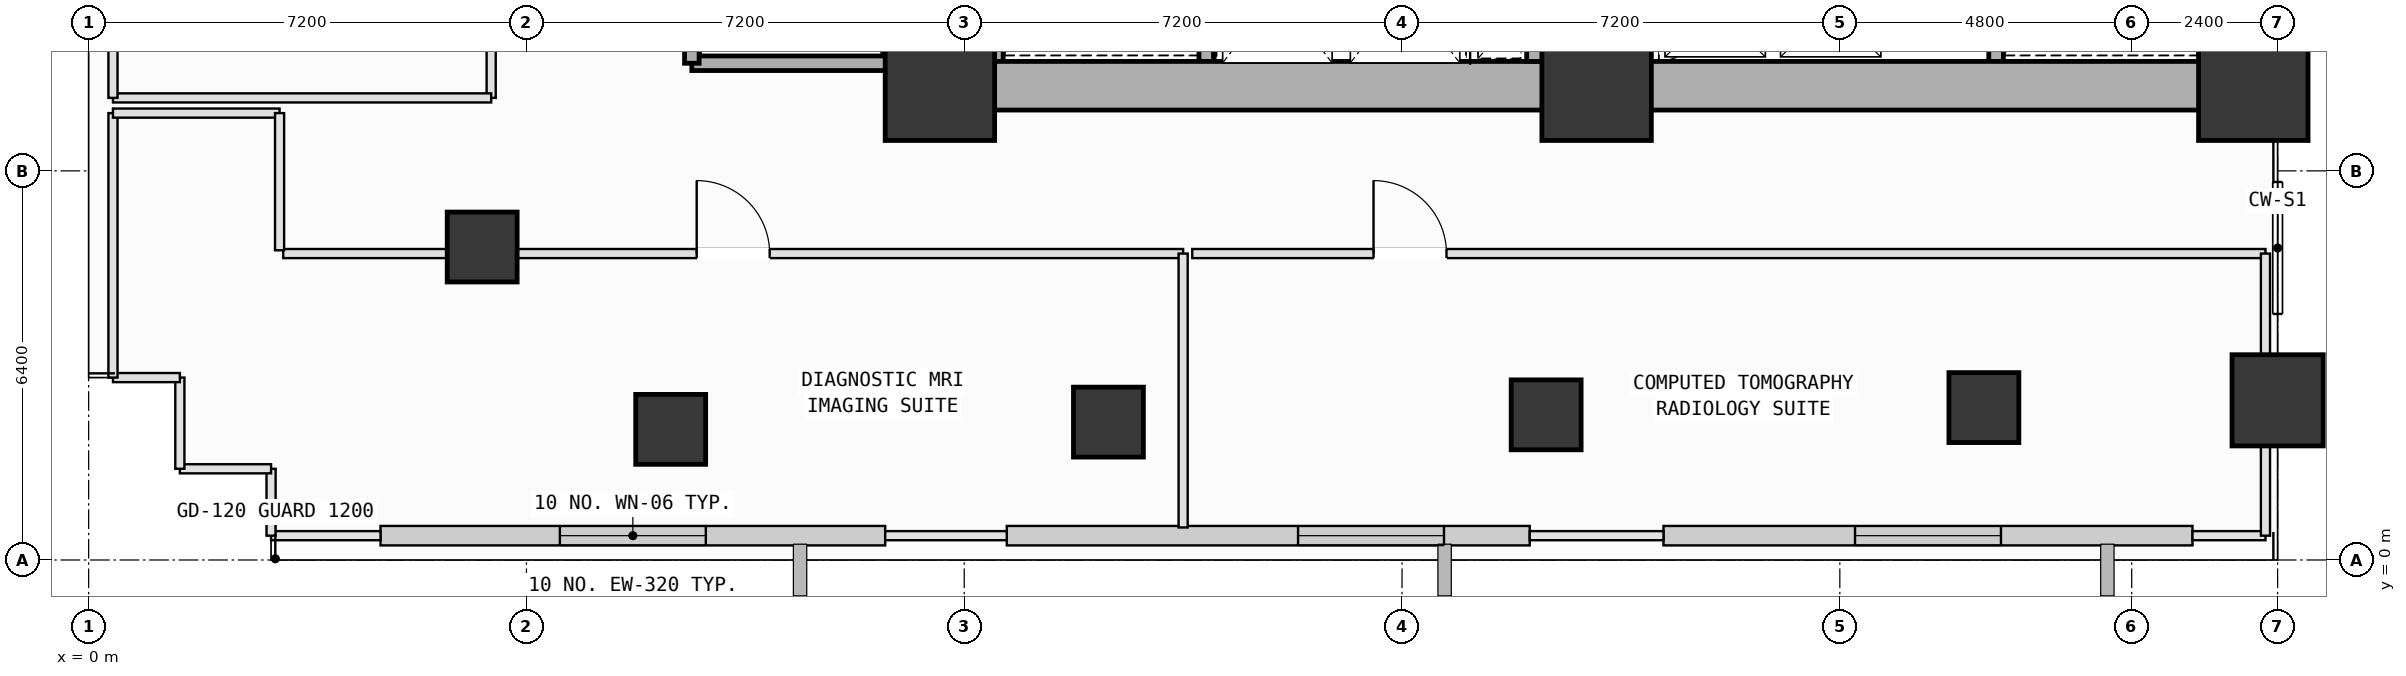
"""IFC4 building model, lengths in metres.
Left out: names, types, materials, properties, quantities, classifications, styles, units other than length and angle.
Written with IfcOpenShell. Run it as: python <this file> out.ifc"""

import sys

from ifc_helpers import new_model, si_unit, direction, frame, frame_2d, origin, origin_2d, place, context, subcontext, project, spatial, rectangle, extrude, element, fill, save


model = new_model("IFC4")
c1 = context("Model", 3, precision=1e-05, world=origin(), true_north=direction((0.0, 1.0)))
c2 = subcontext(c1, "Body", "Model", "MODEL_VIEW")
j1 = project(units=[si_unit("LENGTHUNIT", "METRE"), si_unit("PLANEANGLEUNIT", "RADIAN")], contexts=[c1])
p1 = place(None, origin())
s1 = spatial("IfcSite", under=j1, at=p1, CompositionType="ELEMENT")
p2 = place(p1, origin())
s2 = spatial("IfcBuilding", under=s1, at=p2, CompositionType="ELEMENT")
p3 = place(p2, frame((0.0, 0.0, 5.4)))
s3 = spatial("IfcBuildingStorey", under=s2, at=p3, CompositionType="ELEMENT", Elevation=5.4)
for number, where, z_axis, x_axis in (
    (1, (14.0, 7.8, 0.0), (0.0, 0.0, 1.0), (1.0, 0.0, 0.0)),
    (2, (24.8, 7.8, 0.0), (0.0, 0.0, 1.0), (1.0, 0.0, 0.0)),
    (3, (35.6, 7.8, 0.0), (0.0, 0.0, 1.0), (1.0, 0.0, 0.0)),
):
    element("IfcColumn", number, at=place(p3, frame(where, z_axis=z_axis, x_axis=x_axis)), inside=s3, PredefinedType="COLUMN", context=c2, shape_type="SweptSolid", body=[
        extrude(rectangle(XDim=1.8, YDim=1.8, at=origin_2d()), origin(), (0.0, 0.0, 1.0), 5.4),
    ])
p4 = place(p3, frame((36.0, 2.626, 0.0), z_axis=(0.0, 0.0, 1.0), x_axis=(1.0, 0.0, 0.0)))
e4 = element("IfcColumn", 4, at=p4, inside=s3, PredefinedType="PILASTER", context=c2, shape_type="SweptSolid", body=[
    extrude(rectangle(XDim=1.5, YDim=1.5, at=origin_2d()), origin(), (0.0, 0.0, 1.0), 5.4),
])
for number, where, z_axis, x_axis in (
    (5, (9.572, 2.148, 0.0), (0.0, 0.0, 1.0), (1.0, 0.0, 0.0)),
    (6, (16.771, 2.268, 0.0), (0.0, 0.0, 1.0), (1.0, 0.0, 0.0)),
    (7, (23.97, 2.387, 0.0), (0.0, 0.0, 1.0), (1.0, 0.0, 0.0)),
    (8, (31.169, 2.507, 0.0), (0.0, 0.0, 1.0), (1.0, 0.0, 0.0)),
    (9, (6.472, 5.147, 0.0), (0.0, 0.0, 1.0), (1.0, 0.0, 0.0)),
):
    element("IfcColumn", number, at=place(p3, frame(where, z_axis=z_axis, x_axis=x_axis)), inside=s3, PredefinedType="COLUMN", context=c2, shape_type="SweptSolid", body=[
        extrude(rectangle(XDim=1.15, YDim=1.15, at=origin_2d()), origin(), (0.0, 0.0, 1.0), 5.4),
    ])
p5 = place(p3, frame((13.1, 0.4, 0.0), z_axis=(0.0, 0.0, 1.0), x_axis=(-1.0, 0.0, 0.0)))
e10 = element("IfcWall", 10, at=p5, inside=s3, PredefinedType="SOLIDWALL", context=c2, shape_type="SweptSolid", body=[
    extrude(rectangle(XDim=8.3, YDim=0.32, at=frame_2d((4.15, 0.0))), origin(), (0.0, 0.0, 1.0), 4.23),
])
p6 = place(p5, frame((2.95, 0.0, 0.8)))
e11 = element("IfcOpeningElement", 11, at=p6, cuts=e10, PredefinedType="OPENING", context=c2, shape_type="SweptSolid", body=[
    extrude(rectangle(XDim=2.4, YDim=2.2, at=frame_2d((1.2, 1.1))), frame((0.0, 0.17, 0.0), z_axis=(0.0, -1.0, 0.0), x_axis=(1.0, 0.0, 0.0)), (0.0, 0.0, 1.0), 0.34),
])
p7 = place(p3, frame((23.7, 0.4, 0.0), z_axis=(0.0, 0.0, 1.0), x_axis=(-1.0, 0.0, 0.0)))
e12 = element("IfcWall", 12, at=p7, inside=s3, PredefinedType="SOLIDWALL", context=c2, shape_type="SweptSolid", body=[
    extrude(rectangle(XDim=8.6, YDim=0.32, at=frame_2d((4.3, 0.0))), origin(), (0.0, 0.0, 1.0), 4.23),
])
p8 = place(p7, frame((1.41, 0.0, 0.8)))
e13 = element("IfcOpeningElement", 13, at=p8, cuts=e12, PredefinedType="OPENING", context=c2, shape_type="SweptSolid", body=[
    extrude(rectangle(XDim=2.4, YDim=2.2, at=frame_2d((1.2, 1.1))), frame((0.0, 0.17, 0.0), z_axis=(0.0, -1.0, 0.0), x_axis=(1.0, 0.0, 0.0)), (0.0, 0.0, 1.0), 0.34),
])
p9 = place(p3, frame((34.6, 0.4, 0.0), z_axis=(0.0, 0.0, 1.0), x_axis=(-1.0, 0.0, 0.0)))
e14 = element("IfcWall", 14, at=p9, inside=s3, PredefinedType="SOLIDWALL", context=c2, shape_type="SweptSolid", body=[
    extrude(rectangle(XDim=8.7, YDim=0.32, at=frame_2d((4.35, 0.0))), origin(), (0.0, 0.0, 1.0), 4.23),
])
p10 = place(p9, frame((3.15, 0.0, 0.8)))
e15 = element("IfcOpeningElement", 15, at=p10, cuts=e14, PredefinedType="OPENING", context=c2, shape_type="SweptSolid", body=[
    extrude(rectangle(XDim=2.4, YDim=2.2, at=frame_2d((1.2, 1.1))), frame((0.0, 0.17, 0.0), z_axis=(0.0, -1.0, 0.0), x_axis=(1.0, 0.0, 0.0)), (0.0, 0.0, 1.0), 0.34),
])
for number, where, z_axis, x_axis in (
    (16, (18.38, 15.12, 0.0), (0.0, 0.0, 1.0), (0.0, -1.0, 0.0)),
    (17, (14.92, 8.2, 0.0), (0.0, 0.0, 1.0), (0.0, 1.0, 0.0)),
    (18, (34.83, 15.12, 0.0), (0.0, 0.0, 1.0), (0.0, -1.0, 0.0)),
    (19, (31.37, 8.2, 0.0), (0.0, 0.0, 1.0), (0.0, 1.0, 0.0)),
):
    element("IfcWall", number, at=place(p3, frame(where, z_axis=z_axis, x_axis=x_axis)), inside=s3, PredefinedType="SOLIDWALL", context=c2, shape_type="SweptSolid", body=[
        extrude(rectangle(XDim=6.92, YDim=0.24, at=frame_2d((3.46, 0.0))), origin(), (0.0, 0.0, 1.0), 5.15),
    ])
p11 = place(p3, frame((13.18, 15.22, 0.0), z_axis=(0.0, 0.0, 1.0), x_axis=(0.0, -1.0, 0.0)))
e20 = element("IfcWall", 20, at=p11, inside=s3, PredefinedType="SOLIDWALL", context=c2, shape_type="SweptSolid", body=[
    extrude(rectangle(XDim=7.05, YDim=0.24, at=frame_2d((3.525, 0.0))), origin(), (0.0, 0.0, 1.0), 5.15),
])
p12 = place(p3, frame((13.18, 8.17, 0.0), z_axis=(0.0, 0.0, 1.0), x_axis=(-1.0, 0.0, 0.0)))
e21 = element("IfcWall", 21, at=p12, inside=s3, PredefinedType="SOLIDWALL", context=c2, shape_type="SweptSolid", body=[
    extrude(rectangle(XDim=3.26, YDim=0.24, at=frame_2d((1.63, 0.0))), origin(), (0.0, 0.0, 1.0), 5.15),
])
p13 = place(p3, frame((9.92, 8.17, 0.0), z_axis=(0.0, 0.0, 1.0), x_axis=(0.0, 1.0, 0.0)))
e22 = element("IfcWall", 22, at=p13, inside=s3, PredefinedType="SOLIDWALL", context=c2, shape_type="SweptSolid", body=[
    extrude(rectangle(XDim=7.05, YDim=0.24, at=frame_2d((3.525, 0.0))), origin(), (0.0, 0.0, 1.0), 5.15),
])
for number, where, z_axis, x_axis in (
    (23, (14.0, 7.8, 0.0), (0.0, 0.0, 1.0), (1.0, 0.0, 0.0)),
    (24, (24.8, 7.8, 0.0), (0.0, 0.0, 1.0), (1.0, 0.0, 0.0)),
):
    element("IfcWall", number, at=place(p3, frame(where, z_axis=z_axis, x_axis=x_axis)), inside=s3, PredefinedType="SHEAR", context=c2, shape_type="SweptSolid", body=[
        extrude(rectangle(XDim=10.8, YDim=0.8, at=frame_2d((5.4, 0.0))), origin(), (0.0, 0.0, 1.0), 5.15),
    ])
for number, where, z_axis, x_axis in (
    (25, (35.6, 7.8, 0.0), (0.0, 0.0, 1.0), (0.0, 1.0, 0.0)),
    (26, (14.0, 16.8, 0.0), (0.0, 0.0, 1.0), (0.0, -1.0, 0.0)),
):
    element("IfcWall", number, at=place(p3, frame(where, z_axis=z_axis, x_axis=x_axis)), inside=s3, PredefinedType="SHEAR", context=c2, shape_type="SweptSolid", body=[
        extrude(rectangle(XDim=9.0, YDim=0.8, at=frame_2d((4.5, 0.0))), origin(), (0.0, 0.0, 1.0), 5.15),
    ])
p14 = place(p3, frame((23.8, 8.2, 0.0), z_axis=(0.0, 0.0, 1.0), x_axis=(0.0, 1.0, 0.0)))
e27 = element("IfcWall", 27, at=p14, inside=s3, PredefinedType="SOLIDWALL", context=c2, shape_type="SweptSolid", body=[
    extrude(rectangle(XDim=2.48, YDim=0.3, at=frame_2d((1.24, 0.0))), origin(), (0.0, 0.0, 1.0), 5.15),
])
p15 = place(p3, frame((6.62, 17.6, 0.0), z_axis=(0.0, 0.0, 1.0), x_axis=(0.0, -1.0, 0.0)))
e28 = element("IfcWall", 28, at=p15, inside=s3, PredefinedType="PARTITIONING", context=c2, shape_type="SweptSolid", body=[
    extrude(rectangle(XDim=10.0, YDim=0.15, at=frame_2d((5.0, 0.0))), origin(), (0.0, 0.0, 1.0), 4.235),
])
p16 = place(p15, frame((4.4, 0.0, 0.0)))
e29 = element("IfcOpeningElement", 29, at=p16, cuts=e28, PredefinedType="OPENING", context=c2, shape_type="SweptSolid", body=[
    extrude(rectangle(XDim=1.2, YDim=2.15, at=frame_2d((0.6, 1.075))), frame((0.0, 0.085, 0.0), z_axis=(0.0, -1.0, 0.0), x_axis=(1.0, 0.0, 0.0)), (0.0, 0.0, 1.0), 0.17),
])
p17 = place(p3, frame((6.62, 7.6, 0.0), z_axis=(0.0, 0.0, 1.0), x_axis=(-1.0, 0.0, 0.0)))
e30 = element("IfcWall", 30, at=p17, inside=s3, PredefinedType="PARTITIONING", context=c2, shape_type="SweptSolid", body=[
    extrude(rectangle(XDim=6.22, YDim=0.15, at=frame_2d((3.11, 0.0))), origin(), (0.0, 0.0, 1.0), 5.15),
])
p18 = place(p3, frame((0.4, 7.6, 0.0), z_axis=(0.0, 0.0, 1.0), x_axis=(0.0, 1.0, 0.0)))
e31 = element("IfcWall", 31, at=p18, inside=s3, PredefinedType="PARTITIONING", context=c2, shape_type="SweptSolid", body=[
    extrude(rectangle(XDim=6.0, YDim=0.15, at=frame_2d((3.0, 0.0))), origin(), (0.0, 0.0, 1.0), 5.15),
])
p19 = place(p3, frame((3.2, 5.04, 0.0), z_axis=(0.0, 0.0, 1.0), x_axis=(1.0, 0.0, 0.0)))
e32 = element("IfcWall", 32, at=p19, inside=s3, PredefinedType="PARTITIONING", context=c2, shape_type="SweptSolid", body=[
    extrude(rectangle(XDim=14.8, YDim=0.15, at=frame_2d((7.4, 0.0))), origin(), (0.0, 0.0, 1.0), 4.235),
])
p20 = place(p19, frame((6.8, 0.0, 0.0)))
e33 = element("IfcOpeningElement", 33, at=p20, cuts=e32, PredefinedType="OPENING", context=c2, shape_type="SweptSolid", body=[
    extrude(rectangle(XDim=1.2, YDim=2.15, at=frame_2d((0.6, 1.075))), frame((0.0, 0.085, 0.0), z_axis=(0.0, -1.0, 0.0), x_axis=(1.0, 0.0, 0.0)), (0.0, 0.0, 1.0), 0.17),
])
p21 = place(p3, frame((18.0, 5.04, 0.0), z_axis=(0.0, 0.0, 1.0), x_axis=(0.0, -1.0, 0.0)))
e34 = element("IfcWall", 34, at=p21, inside=s3, PredefinedType="PARTITIONING", context=c2, shape_type="SweptSolid", body=[
    extrude(rectangle(XDim=4.505, YDim=0.15, at=frame_2d((2.252, 0.0))), origin(), (0.0, 0.0, 1.0), 5.15),
])
p22 = place(p3, frame((15.1, 0.4, 0.0), z_axis=(0.0, 0.0, 1.0), x_axis=(-1.0, 0.0, 0.0)))
e35 = element("IfcWall", 35, at=p22, inside=s3, PredefinedType="PARTITIONING", context=c2, shape_type="SweptSolid", body=[
    extrude(rectangle(XDim=2.0, YDim=0.15, at=frame_2d((1.0, 0.0))), origin(), (0.0, 0.0, 1.0), 5.15),
])
p23 = place(p3, frame((4.8, 0.4, 0.0), z_axis=(0.0, 0.0, 1.0), x_axis=(-1.0, 0.0, 0.0)))
e36 = element("IfcWall", 36, at=p23, inside=s3, PredefinedType="PARTITIONING", context=c2, shape_type="SweptSolid", body=[
    extrude(rectangle(XDim=1.8, YDim=0.15, at=frame_2d((0.9, 0.0))), origin(), (0.0, 0.0, 1.0), 5.15),
])
p24 = place(p3, frame((3.0, 0.4, 0.0), z_axis=(0.0, 0.0, 1.0), x_axis=(0.0, 1.0, 0.0)))
e37 = element("IfcWall", 37, at=p24, inside=s3, PredefinedType="PARTITIONING", context=c2, shape_type="SweptSolid", body=[
    extrude(rectangle(XDim=1.1, YDim=0.15, at=frame_2d((0.55, 0.0))), origin(), (0.0, 0.0, 1.0), 5.15),
])
for number, where, z_axis, x_axis in (
    (38, (3.0, 1.5, 0.0), (0.0, 0.0, 1.0), (-1.0, 0.0, 0.0)),
    (39, (1.5, 1.5, 0.0), (0.0, 0.0, 1.0), (0.0, 1.0, 0.0)),
):
    element("IfcWall", number, at=place(p3, frame(where, z_axis=z_axis, x_axis=x_axis)), inside=s3, PredefinedType="PARTITIONING", context=c2, shape_type="SweptSolid", body=[
        extrude(rectangle(XDim=1.5, YDim=0.15, at=frame_2d((0.75, 0.0))), origin(), (0.0, 0.0, 1.0), 5.15),
    ])
p25 = place(p3, frame((1.5, 3.0, 0.0), z_axis=(0.0, 0.0, 1.0), x_axis=(-1.0, 0.0, 0.0)))
e40 = element("IfcWall", 40, at=p25, inside=s3, PredefinedType="PARTITIONING", context=c2, shape_type="SweptSolid", body=[
    extrude(rectangle(XDim=1.1, YDim=0.15, at=frame_2d((0.55, 0.0))), origin(), (0.0, 0.0, 1.0), 5.15),
])
p26 = place(p3, frame((0.4, 3.0, 0.0), z_axis=(0.0, 0.0, 1.0), x_axis=(0.0, 1.0, 0.0)))
e41 = element("IfcWall", 41, at=p26, inside=s3, PredefinedType="PARTITIONING", context=c2, shape_type="SweptSolid", body=[
    extrude(rectangle(XDim=4.35, YDim=0.15, at=frame_2d((2.175, 0.0))), origin(), (0.0, 0.0, 1.0), 5.15),
])
p27 = place(p3, frame((0.4, 7.35, 0.0), z_axis=(0.0, 0.0, 1.0), x_axis=(1.0, 0.0, 0.0)))
e42 = element("IfcWall", 42, at=p27, inside=s3, PredefinedType="PARTITIONING", context=c2, shape_type="SweptSolid", body=[
    extrude(rectangle(XDim=2.74, YDim=0.15, at=frame_2d((1.37, 0.0))), origin(), (0.0, 0.0, 1.0), 5.15),
])
p28 = place(p3, frame((3.14, 7.35, 0.0), z_axis=(0.0, 0.0, 1.0), x_axis=(0.0, -1.0, 0.0)))
e43 = element("IfcWall", 43, at=p28, inside=s3, PredefinedType="PARTITIONING", context=c2, shape_type="SweptSolid", body=[
    extrude(rectangle(XDim=2.256, YDim=0.15, at=frame_2d((1.128, 0.0))), origin(), (0.0, 0.0, 1.0), 5.15),
])
p29 = place(p3, frame((35.8, 0.4, 0.0), z_axis=(0.0, 0.0, 1.0), x_axis=(-1.0, 0.0, 0.0)))
e44 = element("IfcWall", 44, at=p29, inside=s3, PredefinedType="PARTITIONING", context=c2, shape_type="SweptSolid", body=[
    extrude(rectangle(XDim=1.2, YDim=0.15, at=frame_2d((0.6, 0.0))), origin(), (0.0, 0.0, 1.0), 5.15),
])
p30 = place(p3, frame((25.9, 0.4, 0.0), z_axis=(0.0, 0.0, 1.0), x_axis=(-1.0, 0.0, 0.0)))
e45 = element("IfcWall", 45, at=p30, inside=s3, PredefinedType="PARTITIONING", context=c2, shape_type="SweptSolid", body=[
    extrude(rectangle(XDim=2.2, YDim=0.15, at=frame_2d((1.1, 0.0))), origin(), (0.0, 0.0, 1.0), 5.15),
])
p31 = place(p3, frame((18.15, 5.04, 0.0), z_axis=(0.0, 0.0, 1.0), x_axis=(1.0, 0.0, 0.0)))
e46 = element("IfcWall", 46, at=p31, inside=s3, PredefinedType="PARTITIONING", context=c2, shape_type="SweptSolid", body=[
    extrude(rectangle(XDim=17.65, YDim=0.15, at=frame_2d((8.825, 0.0))), origin(), (0.0, 0.0, 1.0), 5.15),
])
p32 = place(p31, frame((2.981, 0.0, 0.0)))
e47 = element("IfcOpeningElement", 47, at=p32, cuts=e46, PredefinedType="OPENING", context=c2, shape_type="SweptSolid", body=[
    extrude(rectangle(XDim=1.2, YDim=2.15, at=frame_2d((0.6, 1.075))), frame((0.0, 0.085, 0.0), z_axis=(0.0, -1.0, 0.0), x_axis=(1.0, 0.0, 0.0)), (0.0, 0.0, 1.0), 0.17),
])
p33 = place(p3, frame((35.8, 5.04, 0.0), z_axis=(0.0, 0.0, 1.0), x_axis=(0.0, -1.0, 0.0)))
e48 = element("IfcWall", 48, at=p33, inside=s3, PredefinedType="PARTITIONING", context=c2, shape_type="SweptSolid", body=[
    extrude(rectangle(XDim=4.64, YDim=0.15, at=frame_2d((2.32, 0.0))), origin(), (0.0, 0.0, 1.0), 4.235),
])
p34 = place(p6, origin())
e49 = element("IfcWindow", 49, at=p34, inside=s3, PartitioningType="SINGLE_PANEL", PredefinedType="WINDOW", context=c2, shape_type="SweptSolid", body=[
    extrude(rectangle(XDim=2.4, YDim=2.2, at=frame_2d((1.2, 1.1))), frame((0.0, 0.03, 0.0), z_axis=(0.0, -1.0, 0.0), x_axis=(1.0, 0.0, 0.0)), (0.0, 0.0, 1.0), 0.06),
])
fill(e11, e49)
p35 = place(p8, origin())
e50 = element("IfcWindow", 50, at=p35, inside=s3, PartitioningType="SINGLE_PANEL", PredefinedType="WINDOW", context=c2, shape_type="SweptSolid", body=[
    extrude(rectangle(XDim=2.4, YDim=2.2, at=frame_2d((1.2, 1.1))), frame((0.0, 0.03, 0.0), z_axis=(0.0, -1.0, 0.0), x_axis=(1.0, 0.0, 0.0)), (0.0, 0.0, 1.0), 0.06),
])
fill(e13, e50)
p36 = place(p10, origin())
e51 = element("IfcWindow", 51, at=p36, inside=s3, PartitioningType="SINGLE_PANEL", PredefinedType="WINDOW", context=c2, shape_type="SweptSolid", body=[
    extrude(rectangle(XDim=2.4, YDim=2.2, at=frame_2d((1.2, 1.1))), frame((0.0, 0.03, 0.0), z_axis=(0.0, -1.0, 0.0), x_axis=(1.0, 0.0, 0.0)), (0.0, 0.0, 1.0), 0.06),
])
fill(e15, e51)
p37 = place(p20, origin())
e52 = element("IfcDoor", 52, at=p37, inside=s3, OperationType="SINGLE_SWING_LEFT", PredefinedType="DOOR", context=c2, shape_type="SweptSolid", body=[
    extrude(rectangle(XDim=1.2, YDim=2.15, at=frame_2d((0.6, 1.075))), frame((0.0, 0.025, 0.0), z_axis=(0.0, -1.0, 0.0), x_axis=(1.0, 0.0, 0.0)), (0.0, 0.0, 1.0), 0.05),
])
fill(e33, e52)
p38 = place(p32, origin())
e53 = element("IfcDoor", 53, at=p38, inside=s3, OperationType="SINGLE_SWING_LEFT", PredefinedType="DOOR", context=c2, shape_type="SweptSolid", body=[
    extrude(rectangle(XDim=1.2, YDim=2.15, at=frame_2d((0.6, 1.075))), frame((0.0, 0.025, 0.0), z_axis=(0.0, -1.0, 0.0), x_axis=(1.0, 0.0, 0.0)), (0.0, 0.0, 1.0), 0.05),
])
fill(e47, e53)
save(model, sys.argv[1])
